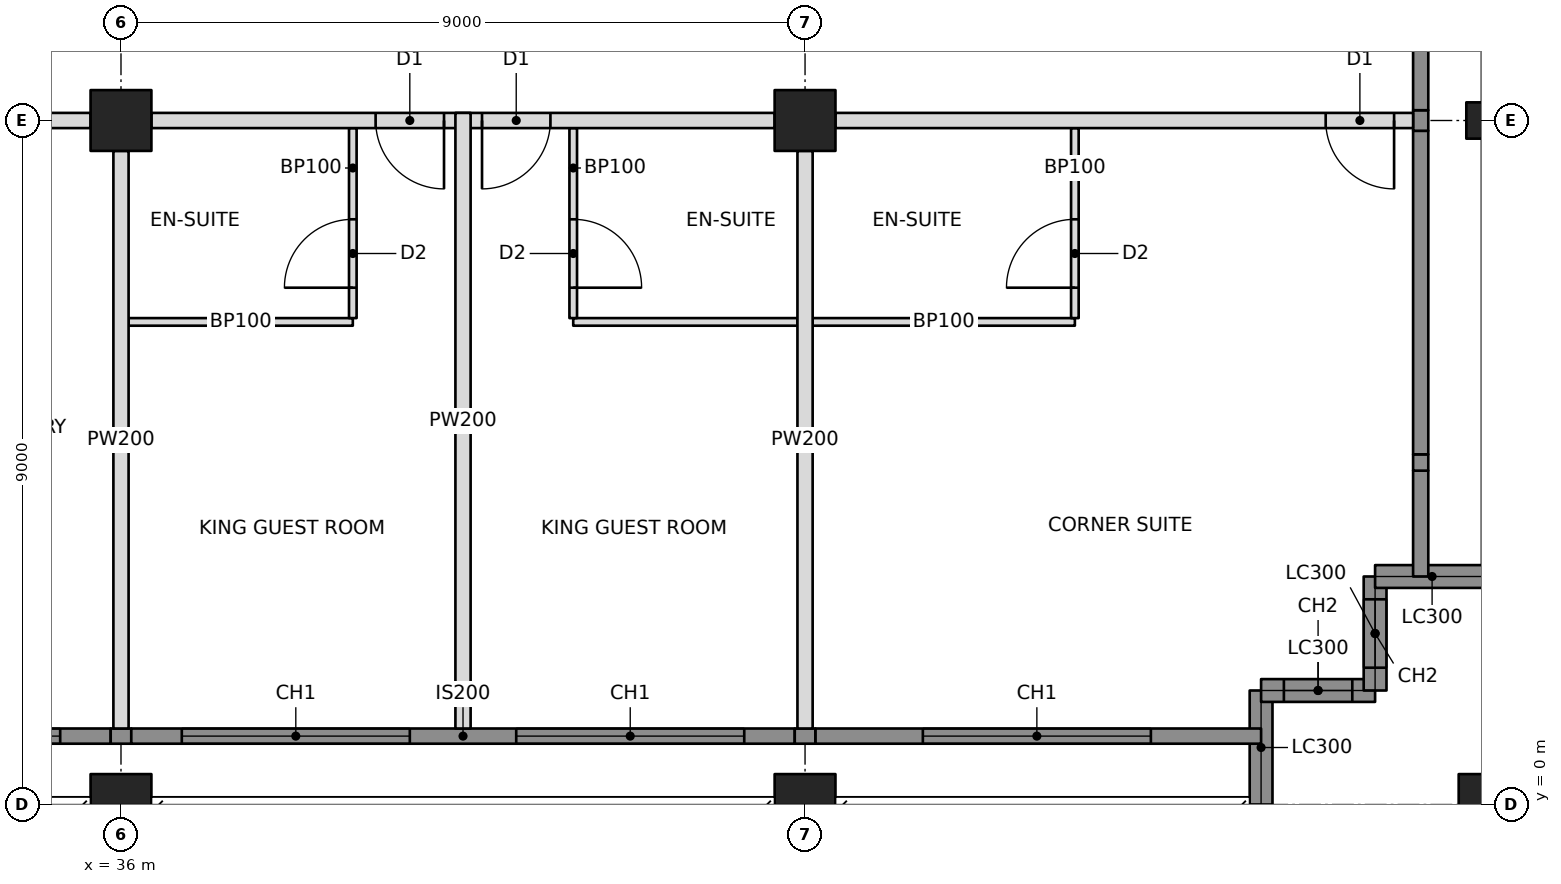
"""IFC4 building model, lengths in metres.
Left out: names, types, materials, properties, quantities, classifications, styles, units other than length and angle.
Written with IfcOpenShell. Run it as: python <this file> out.ifc"""

import sys

from ifc_helpers import new_model, si_unit, direction, frame, frame_2d, origin, origin_2d, place, context, subcontext, project, spatial, rectangle, hollow_rectangle, i_section, extrude, element, fill, save


model = new_model("IFC4")
c1 = context("Model", 3, precision=1e-05, world=origin(), true_north=direction((0.0, 1.0)))
c2 = subcontext(c1, "Body", "Model", "MODEL_VIEW")
j1 = project(units=[si_unit("LENGTHUNIT", "METRE"), si_unit("PLANEANGLEUNIT", "RADIAN")], contexts=[c1])
p1 = place(None, origin())
s1 = spatial("IfcSite", under=j1, at=p1, CompositionType="ELEMENT")
p2 = place(p1, origin())
s2 = spatial("IfcBuilding", under=s1, at=p2, CompositionType="ELEMENT")
p3 = place(p2, frame((0.0, 0.0, 28.0)))
s3 = spatial("IfcBuildingStorey", under=s2, at=p3, CompositionType="ELEMENT", Elevation=28.0)
for number, where, z_axis, x_axis in (
    (1, (36.0, 0.0, 0.0), (0.0, 0.0, 1.0), (1.0, 0.0, 0.0)),
    (2, (36.0, 9.0, 0.0), (0.0, 0.0, 1.0), (0.0, 1.0, 0.0)),
    (3, (45.0, 0.0, 0.0), (0.0, 0.0, 1.0), (1.0, 0.0, 0.0)),
    (4, (45.0, 9.0, 0.0), (0.0, 0.0, 1.0), (0.0, 1.0, 0.0)),
    (5, (54.0, 0.0, 0.0), (0.0, 0.0, 1.0), (1.0, 0.0, 0.0)),
):
    element("IfcColumn", number, at=place(p3, frame(where, z_axis=z_axis, x_axis=x_axis)), inside=s3, PredefinedType="COLUMN", context=c2, shape_type="SweptSolid", body=[
        extrude(hollow_rectangle(XDim=0.8, YDim=0.8, WallThickness=0.1, at=origin_2d()), origin(), (0.0, 0.0, 1.0), 3.4),
    ])
p4 = place(p3, frame((54.0, 9.0, 0.0), z_axis=(0.0, 0.0, 1.0), x_axis=(0.0, 1.0, 0.0)))
e6 = element("IfcColumn", 6, at=p4, inside=s3, PredefinedType="COLUMN", context=c2, shape_type="SweptSolid", body=[
    extrude(i_section(OverallWidth=0.478, OverallDepth=0.599, WebThickness=0.1, FlangeThickness=0.14, at=origin_2d()), origin(), (0.0, 0.0, 1.0), 3.4),
])
p5 = place(p3, frame((51.0, 0.0, 0.0), z_axis=(0.0, 0.0, 1.0), x_axis=(0.0, 1.0, 0.0)))
e7 = element("IfcWall", 7, at=p5, inside=s3, PredefinedType="SOLIDWALL", context=c2, shape_type="SweptSolid", body=[
    extrude(rectangle(XDim=1.5, YDim=0.3, at=frame_2d((0.75, 0.0))), origin(), (0.0, 0.0, 1.0), 2.42),
])
p6 = place(p3, frame((51.0, 1.5, 0.0), z_axis=(0.0, 0.0, 1.0), x_axis=(1.0, 0.0, 0.0)))
e8 = element("IfcWall", 8, at=p6, inside=s3, PredefinedType="SOLIDWALL", context=c2, shape_type="SweptSolid", body=[
    extrude(rectangle(XDim=1.5, YDim=0.3, at=frame_2d((0.75, 0.0))), origin(), (0.0, 0.0, 1.0), 3.2),
])
p7 = place(p6, frame((0.3, 0.0, 0.6)))
e9 = element("IfcOpeningElement", 9, at=p7, cuts=e8, PredefinedType="OPENING", context=c2, shape_type="SweptSolid", body=[
    extrude(rectangle(XDim=0.9, YDim=2.2, at=frame_2d((0.45, 1.1))), frame((0.0, 0.16, 0.0), z_axis=(0.0, -1.0, 0.0), x_axis=(1.0, 0.0, 0.0)), (0.0, 0.0, 1.0), 0.32),
])
p8 = place(p3, frame((52.5, 1.5, 0.0), z_axis=(0.0, 0.0, 1.0), x_axis=(0.0, 1.0, 0.0)))
e10 = element("IfcWall", 10, at=p8, inside=s3, PredefinedType="SOLIDWALL", context=c2, shape_type="SweptSolid", body=[
    extrude(rectangle(XDim=1.5, YDim=0.3, at=frame_2d((0.75, 0.0))), origin(), (0.0, 0.0, 1.0), 3.2),
])
p9 = place(p8, frame((0.3, 0.0, 0.6)))
e11 = element("IfcOpeningElement", 11, at=p9, cuts=e10, PredefinedType="OPENING", context=c2, shape_type="SweptSolid", body=[
    extrude(rectangle(XDim=0.9, YDim=2.2, at=frame_2d((0.45, 1.1))), frame((0.0, 0.16, 0.0), z_axis=(0.0, -1.0, 0.0), x_axis=(1.0, 0.0, 0.0)), (0.0, 0.0, 1.0), 0.32),
])
p10 = place(p3, frame((52.5, 3.0, 0.0), z_axis=(0.0, 0.0, 1.0), x_axis=(1.0, 0.0, 0.0)))
e12 = element("IfcWall", 12, at=p10, inside=s3, PredefinedType="SOLIDWALL", context=c2, shape_type="SweptSolid", body=[
    extrude(rectangle(XDim=1.5, YDim=0.3, at=frame_2d((0.75, 0.0))), origin(), (0.0, 0.0, 1.0), 2.42),
])
p11 = place(p3, frame((53.1, 3.0, 0.0), z_axis=(0.0, 0.0, 1.0), x_axis=(0.0, 1.0, 0.0)))
e13 = element("IfcWall", 13, at=p11, inside=s3, PredefinedType="SOLIDWALL", context=c2, shape_type="SweptSolid", body=[
    extrude(rectangle(XDim=1.393, YDim=0.2, at=frame_2d((0.696, 0.0))), origin(), (0.0, 0.0, 1.0), 3.2),
])
p12 = place(p3, frame((27.4, 9.0, 0.0), z_axis=(0.0, 0.0, 1.0), x_axis=(1.0, 0.0, 0.0)))
e14 = element("IfcWall", 14, at=p12, inside=s3, PredefinedType="PARTITIONING", context=c2, shape_type="SweptSolid", body=[
    extrude(rectangle(XDim=8.2, YDim=0.2, at=frame_2d((4.1, 0.0))), origin(), (0.0, 0.0, 1.0), 2.405),
])
p13 = place(p12, frame((2.95, 0.0, 0.0)))
e15 = element("IfcOpeningElement", 15, at=p13, cuts=e14, PredefinedType="OPENING", context=c2, shape_type="SweptSolid", body=[
    extrude(rectangle(XDim=0.9, YDim=2.1, at=frame_2d((0.45, 1.05))), frame((0.0, 0.11, 0.0), z_axis=(0.0, -1.0, 0.0), x_axis=(1.0, 0.0, 0.0)), (0.0, 0.0, 1.0), 0.22),
])
p14 = place(p12, frame((4.35, 0.0, 0.0)))
e16 = element("IfcOpeningElement", 16, at=p14, cuts=e14, PredefinedType="OPENING", context=c2, shape_type="SweptSolid", body=[
    extrude(rectangle(XDim=1.0, YDim=2.1, at=frame_2d((0.5, 1.05))), frame((0.0, 0.11, 0.0), z_axis=(0.0, -1.0, 0.0), x_axis=(1.0, 0.0, 0.0)), (0.0, 0.0, 1.0), 0.22),
])
p15 = place(p3, frame((36.4, 9.0, 0.0), z_axis=(0.0, 0.0, 1.0), x_axis=(1.0, 0.0, 0.0)))
e17 = element("IfcWall", 17, at=p15, inside=s3, PredefinedType="PARTITIONING", context=c2, shape_type="SweptSolid", body=[
    extrude(rectangle(XDim=8.2, YDim=0.2, at=frame_2d((4.1, 0.0))), origin(), (0.0, 0.0, 1.0), 2.438),
])
p16 = place(p15, frame((2.95, 0.0, 0.0)))
e18 = element("IfcOpeningElement", 18, at=p16, cuts=e17, PredefinedType="OPENING", context=c2, shape_type="SweptSolid", body=[
    extrude(rectangle(XDim=0.9, YDim=2.1, at=frame_2d((0.45, 1.05))), frame((0.0, 0.11, 0.0), z_axis=(0.0, -1.0, 0.0), x_axis=(1.0, 0.0, 0.0)), (0.0, 0.0, 1.0), 0.22),
])
p17 = place(p15, frame((4.35, 0.0, 0.0)))
e19 = element("IfcOpeningElement", 19, at=p17, cuts=e17, PredefinedType="OPENING", context=c2, shape_type="SweptSolid", body=[
    extrude(rectangle(XDim=0.9, YDim=2.1, at=frame_2d((0.45, 1.05))), frame((0.0, 0.11, 0.0), z_axis=(0.0, -1.0, 0.0), x_axis=(1.0, 0.0, 0.0)), (0.0, 0.0, 1.0), 0.22),
])
p18 = place(p3, frame((45.4, 9.0, 0.0), z_axis=(0.0, 0.0, 1.0), x_axis=(1.0, 0.0, 0.0)))
e20 = element("IfcWall", 20, at=p18, inside=s3, PredefinedType="PARTITIONING", context=c2, shape_type="SweptSolid", body=[
    extrude(rectangle(XDim=7.6, YDim=0.2, at=frame_2d((3.8, 0.0))), origin(), (0.0, 0.0, 1.0), 2.438),
])
p19 = place(p18, frame((6.45, 0.0, 0.0)))
e21 = element("IfcOpeningElement", 21, at=p19, cuts=e20, PredefinedType="OPENING", context=c2, shape_type="SweptSolid", body=[
    extrude(rectangle(XDim=0.9, YDim=2.1, at=frame_2d((0.45, 1.05))), frame((0.0, 0.11, 0.0), z_axis=(0.0, -1.0, 0.0), x_axis=(1.0, 0.0, 0.0)), (0.0, 0.0, 1.0), 0.22),
])
for number, where, z_axis, x_axis in (
    (22, (36.0, 8.6, 0.0), (0.0, 0.0, 1.0), (0.0, -1.0, 0.0)),
    (23, (45.0, 8.6, 0.0), (0.0, 0.0, 1.0), (0.0, -1.0, 0.0)),
):
    element("IfcWall", number, at=place(p3, frame(where, z_axis=z_axis, x_axis=x_axis)), inside=s3, PredefinedType="PARTITIONING", context=c2, shape_type="SweptSolid", body=[
        extrude(rectangle(XDim=7.6, YDim=0.2, at=frame_2d((3.8, 0.0))), origin(), (0.0, 0.0, 1.0), 2.438),
    ])
p20 = place(p3, frame((40.5, 9.1, 0.0), z_axis=(0.0, 0.0, 1.0), x_axis=(0.0, -1.0, 0.0)))
e24 = element("IfcWall", 24, at=p20, inside=s3, PredefinedType="PARTITIONING", context=c2, shape_type="SweptSolid", body=[
    extrude(rectangle(XDim=8.1, YDim=0.2, at=frame_2d((4.05, 0.0))), origin(), (0.0, 0.0, 1.0), 2.438),
])
p21 = place(p3, frame((36.1, 6.35, 0.0), z_axis=(0.0, 0.0, 1.0), x_axis=(1.0, 0.0, 0.0)))
e25 = element("IfcWall", 25, at=p21, inside=s3, PredefinedType="PARTITIONING", context=c2, shape_type="SweptSolid", body=[
    extrude(rectangle(XDim=2.95, YDim=0.1, at=frame_2d((1.475, 0.0))), origin(), (0.0, 0.0, 1.0), 2.438),
])
p22 = place(p3, frame((39.05, 8.9, 0.0), z_axis=(0.0, 0.0, 1.0), x_axis=(0.0, -1.0, 0.0)))
e26 = element("IfcWall", 26, at=p22, inside=s3, PredefinedType="PARTITIONING", context=c2, shape_type="SweptSolid", body=[
    extrude(rectangle(XDim=2.5, YDim=0.1, at=frame_2d((1.25, 0.0))), origin(), (0.0, 0.0, 1.0), 2.438),
])
p23 = place(p22, frame((1.2, 0.0, 0.0)))
e27 = element("IfcOpeningElement", 27, at=p23, cuts=e26, PredefinedType="OPENING", context=c2, shape_type="SweptSolid", body=[
    extrude(rectangle(XDim=0.9, YDim=2.1, at=frame_2d((0.45, 1.05))), frame((0.0, 0.06, 0.0), z_axis=(0.0, -1.0, 0.0), x_axis=(1.0, 0.0, 0.0)), (0.0, 0.0, 1.0), 0.12),
])
p24 = place(p3, frame((41.95, 6.35, 0.0), z_axis=(0.0, 0.0, 1.0), x_axis=(1.0, 0.0, 0.0)))
e28 = element("IfcWall", 28, at=p24, inside=s3, PredefinedType="PARTITIONING", context=c2, shape_type="SweptSolid", body=[
    extrude(rectangle(XDim=2.95, YDim=0.1, at=frame_2d((1.475, 0.0))), origin(), (0.0, 0.0, 1.0), 2.438),
])
p25 = place(p3, frame((41.95, 8.9, 0.0), z_axis=(0.0, 0.0, 1.0), x_axis=(0.0, -1.0, 0.0)))
e29 = element("IfcWall", 29, at=p25, inside=s3, PredefinedType="PARTITIONING", context=c2, shape_type="SweptSolid", body=[
    extrude(rectangle(XDim=2.5, YDim=0.1, at=frame_2d((1.25, 0.0))), origin(), (0.0, 0.0, 1.0), 2.438),
])
p26 = place(p25, frame((1.2, 0.0, 0.0)))
e30 = element("IfcOpeningElement", 30, at=p26, cuts=e29, PredefinedType="OPENING", context=c2, shape_type="SweptSolid", body=[
    extrude(rectangle(XDim=0.9, YDim=2.1, at=frame_2d((0.45, 1.05))), frame((0.0, 0.06, 0.0), z_axis=(0.0, -1.0, 0.0), x_axis=(1.0, 0.0, 0.0)), (0.0, 0.0, 1.0), 0.12),
])
p27 = place(p3, frame((45.1, 6.35, 0.0), z_axis=(0.0, 0.0, 1.0), x_axis=(1.0, 0.0, 0.0)))
e31 = element("IfcWall", 31, at=p27, inside=s3, PredefinedType="PARTITIONING", context=c2, shape_type="SweptSolid", body=[
    extrude(rectangle(XDim=3.45, YDim=0.1, at=frame_2d((1.725, 0.0))), origin(), (0.0, 0.0, 1.0), 2.438),
])
p28 = place(p3, frame((48.55, 8.9, 0.0), z_axis=(0.0, 0.0, 1.0), x_axis=(0.0, -1.0, 0.0)))
e32 = element("IfcWall", 32, at=p28, inside=s3, PredefinedType="PARTITIONING", context=c2, shape_type="SweptSolid", body=[
    extrude(rectangle(XDim=2.5, YDim=0.1, at=frame_2d((1.25, 0.0))), origin(), (0.0, 0.0, 1.0), 2.438),
])
p29 = place(p28, frame((1.2, 0.0, 0.0)))
e33 = element("IfcOpeningElement", 33, at=p29, cuts=e32, PredefinedType="OPENING", context=c2, shape_type="SweptSolid", body=[
    extrude(rectangle(XDim=0.9, YDim=2.1, at=frame_2d((0.45, 1.05))), frame((0.0, 0.06, 0.0), z_axis=(0.0, -1.0, 0.0), x_axis=(1.0, 0.0, 0.0)), (0.0, 0.0, 1.0), 0.12),
])
p30 = place(p3, frame((27.194, 0.9, 0.0), z_axis=(0.0, 0.0, 1.0), x_axis=(1.0, 0.0, 0.0)))
e34 = element("IfcWall", 34, at=p30, inside=s3, PredefinedType="SOLIDWALL", context=c2, shape_type="SweptSolid", body=[
    extrude(rectangle(XDim=8.671, YDim=0.2, at=frame_2d((4.335, 0.0))), origin(), (0.0, 0.0, 1.0), 3.2),
])
p31 = place(p30, frame((0.606, 0.0, 0.6)))
e35 = element("IfcOpeningElement", 35, at=p31, cuts=e34, PredefinedType="OPENING", context=c2, shape_type="SweptSolid", body=[
    extrude(rectangle(XDim=3.0, YDim=2.2, at=frame_2d((1.5, 1.1))), frame((0.0, 0.11, 0.0), z_axis=(0.0, -1.0, 0.0), x_axis=(1.0, 0.0, 0.0)), (0.0, 0.0, 1.0), 0.22),
])
p32 = place(p30, frame((5.006, 0.0, 0.6)))
e36 = element("IfcOpeningElement", 36, at=p32, cuts=e34, PredefinedType="OPENING", context=c2, shape_type="SweptSolid", body=[
    extrude(rectangle(XDim=3.0, YDim=2.2, at=frame_2d((1.5, 1.1))), frame((0.0, 0.11, 0.0), z_axis=(0.0, -1.0, 0.0), x_axis=(1.0, 0.0, 0.0)), (0.0, 0.0, 1.0), 0.22),
])
p33 = place(p3, frame((35.865, 0.9, 0.0), z_axis=(0.0, 0.0, 1.0), x_axis=(1.0, 0.0, 0.0)))
e37 = element("IfcWall", 37, at=p33, inside=s3, PredefinedType="SOLIDWALL", context=c2, shape_type="SweptSolid", body=[
    extrude(rectangle(XDim=0.271, YDim=0.2, at=frame_2d((0.135, 0.0))), origin(), (0.0, 0.0, 1.0), 2.438),
])
p34 = place(p3, frame((36.135, 0.9, 0.0), z_axis=(0.0, 0.0, 1.0), x_axis=(1.0, 0.0, 0.0)))
e38 = element("IfcWall", 38, at=p34, inside=s3, PredefinedType="SOLIDWALL", context=c2, shape_type="SweptSolid", body=[
    extrude(rectangle(XDim=8.729, YDim=0.2, at=frame_2d((4.365, 0.0))), origin(), (0.0, 0.0, 1.0), 3.2),
])
p35 = place(p34, frame((0.665, 0.0, 0.6)))
e39 = element("IfcOpeningElement", 39, at=p35, cuts=e38, PredefinedType="OPENING", context=c2, shape_type="SweptSolid", body=[
    extrude(rectangle(XDim=3.0, YDim=2.2, at=frame_2d((1.5, 1.1))), frame((0.0, 0.11, 0.0), z_axis=(0.0, -1.0, 0.0), x_axis=(1.0, 0.0, 0.0)), (0.0, 0.0, 1.0), 0.22),
])
p36 = place(p34, frame((5.065, 0.0, 0.6)))
e40 = element("IfcOpeningElement", 40, at=p36, cuts=e38, PredefinedType="OPENING", context=c2, shape_type="SweptSolid", body=[
    extrude(rectangle(XDim=3.0, YDim=2.2, at=frame_2d((1.5, 1.1))), frame((0.0, 0.11, 0.0), z_axis=(0.0, -1.0, 0.0), x_axis=(1.0, 0.0, 0.0)), (0.0, 0.0, 1.0), 0.22),
])
p37 = place(p3, frame((44.865, 0.9, 0.0), z_axis=(0.0, 0.0, 1.0), x_axis=(1.0, 0.0, 0.0)))
e41 = element("IfcWall", 41, at=p37, inside=s3, PredefinedType="SOLIDWALL", context=c2, shape_type="SweptSolid", body=[
    extrude(rectangle(XDim=0.271, YDim=0.2, at=frame_2d((0.135, 0.0))), origin(), (0.0, 0.0, 1.0), 2.438),
])
p38 = place(p3, frame((45.135, 0.9, 0.0), z_axis=(0.0, 0.0, 1.0), x_axis=(1.0, 0.0, 0.0)))
e42 = element("IfcWall", 42, at=p38, inside=s3, PredefinedType="SOLIDWALL", context=c2, shape_type="SweptSolid", body=[
    extrude(rectangle(XDim=5.865, YDim=0.2, at=frame_2d((2.932, 0.0))), origin(), (0.0, 0.0, 1.0), 3.2),
])
p39 = place(p38, frame((1.415, 0.0, 0.6)))
e43 = element("IfcOpeningElement", 43, at=p39, cuts=e42, PredefinedType="OPENING", context=c2, shape_type="SweptSolid", body=[
    extrude(rectangle(XDim=3.0, YDim=2.2, at=frame_2d((1.5, 1.1))), frame((0.0, 0.11, 0.0), z_axis=(0.0, -1.0, 0.0), x_axis=(1.0, 0.0, 0.0)), (0.0, 0.0, 1.0), 0.22),
])
p40 = place(p3, frame((53.1, 4.393, 0.0), z_axis=(0.0, 0.0, 1.0), x_axis=(0.0, 1.0, 0.0)))
e44 = element("IfcWall", 44, at=p40, inside=s3, PredefinedType="SOLIDWALL", context=c2, shape_type="SweptSolid", body=[
    extrude(rectangle(XDim=0.215, YDim=0.2, at=frame_2d((0.107, 0.0))), origin(), (0.0, 0.0, 1.0), 2.661),
])
p41 = place(p3, frame((53.1, 4.607, 0.0), z_axis=(0.0, 0.0, 1.0), x_axis=(0.0, 1.0, 0.0)))
e45 = element("IfcWall", 45, at=p41, inside=s3, PredefinedType="SOLIDWALL", context=c2, shape_type="SweptSolid", body=[
    extrude(rectangle(XDim=4.257, YDim=0.2, at=frame_2d((2.129, 0.0))), origin(), (0.0, 0.0, 1.0), 3.2),
])
p42 = place(p3, frame((53.1, 8.865, 0.0), z_axis=(0.0, 0.0, 1.0), x_axis=(0.0, 1.0, 0.0)))
e46 = element("IfcWall", 46, at=p42, inside=s3, PredefinedType="SOLIDWALL", context=c2, shape_type="SweptSolid", body=[
    extrude(rectangle(XDim=0.271, YDim=0.2, at=frame_2d((0.135, 0.0))), origin(), (0.0, 0.0, 1.0), 2.438),
])
p43 = place(p3, frame((53.1, 9.135, 0.0), z_axis=(0.0, 0.0, 1.0), x_axis=(0.0, 1.0, 0.0)))
e47 = element("IfcWall", 47, at=p43, inside=s3, PredefinedType="SOLIDWALL", context=c2, shape_type="SweptSolid", body=[
    extrude(rectangle(XDim=8.729, YDim=0.2, at=frame_2d((4.365, 0.0))), origin(), (0.0, 0.0, 1.0), 3.2),
])
p44 = place(p43, frame((2.015, 0.0, 0.6)))
e48 = element("IfcOpeningElement", 48, at=p44, cuts=e47, PredefinedType="OPENING", context=c2, shape_type="SweptSolid", body=[
    extrude(rectangle(XDim=3.0, YDim=2.2, at=frame_2d((1.5, 1.1))), frame((0.0, 0.11, 0.0), z_axis=(0.0, -1.0, 0.0), x_axis=(1.0, 0.0, 0.0)), (0.0, 0.0, 1.0), 0.22),
])
p45 = place(p43, frame((5.515, 0.0, 0.6)))
e49 = element("IfcOpeningElement", 49, at=p45, cuts=e47, PredefinedType="OPENING", context=c2, shape_type="SweptSolid", body=[
    extrude(rectangle(XDim=3.0, YDim=2.2, at=frame_2d((1.5, 1.1))), frame((0.0, 0.11, 0.0), z_axis=(0.0, -1.0, 0.0), x_axis=(1.0, 0.0, 0.0)), (0.0, 0.0, 1.0), 0.22),
])
p46 = place(p7, origin())
e50 = element("IfcWindow", 50, at=p46, inside=s3, PartitioningType="SINGLE_PANEL", PredefinedType="WINDOW", context=c2, shape_type="SweptSolid", body=[
    extrude(rectangle(XDim=0.9, YDim=2.2, at=frame_2d((0.45, 1.1))), frame((0.0, 0.03, 0.0), z_axis=(0.0, -1.0, 0.0), x_axis=(1.0, 0.0, 0.0)), (0.0, 0.0, 1.0), 0.06),
])
fill(e9, e50)
p47 = place(p9, origin())
e51 = element("IfcWindow", 51, at=p47, inside=s3, PartitioningType="SINGLE_PANEL", PredefinedType="WINDOW", context=c2, shape_type="SweptSolid", body=[
    extrude(rectangle(XDim=0.9, YDim=2.2, at=frame_2d((0.45, 1.1))), frame((0.0, 0.03, 0.0), z_axis=(0.0, -1.0, 0.0), x_axis=(1.0, 0.0, 0.0)), (0.0, 0.0, 1.0), 0.06),
])
fill(e11, e51)
p48 = place(p32, origin())
e52 = element("IfcWindow", 52, at=p48, inside=s3, PartitioningType="TRIPLE_PANEL_VERTICAL", PredefinedType="WINDOW", context=c2, shape_type="SweptSolid", body=[
    extrude(rectangle(XDim=3.0, YDim=2.2, at=frame_2d((1.5, 1.1))), frame((0.0, 0.03, 0.0), z_axis=(0.0, -1.0, 0.0), x_axis=(1.0, 0.0, 0.0)), (0.0, 0.0, 1.0), 0.06),
])
fill(e36, e52)
p49 = place(p35, origin())
e53 = element("IfcWindow", 53, at=p49, inside=s3, PartitioningType="TRIPLE_PANEL_VERTICAL", PredefinedType="WINDOW", context=c2, shape_type="SweptSolid", body=[
    extrude(rectangle(XDim=3.0, YDim=2.2, at=frame_2d((1.5, 1.1))), frame((0.0, 0.03, 0.0), z_axis=(0.0, -1.0, 0.0), x_axis=(1.0, 0.0, 0.0)), (0.0, 0.0, 1.0), 0.06),
])
fill(e39, e53)
p50 = place(p36, origin())
e54 = element("IfcWindow", 54, at=p50, inside=s3, PartitioningType="TRIPLE_PANEL_VERTICAL", PredefinedType="WINDOW", context=c2, shape_type="SweptSolid", body=[
    extrude(rectangle(XDim=3.0, YDim=2.2, at=frame_2d((1.5, 1.1))), frame((0.0, 0.03, 0.0), z_axis=(0.0, -1.0, 0.0), x_axis=(1.0, 0.0, 0.0)), (0.0, 0.0, 1.0), 0.06),
])
fill(e40, e54)
p51 = place(p39, origin())
e55 = element("IfcWindow", 55, at=p51, inside=s3, PartitioningType="TRIPLE_PANEL_VERTICAL", PredefinedType="WINDOW", context=c2, shape_type="SweptSolid", body=[
    extrude(rectangle(XDim=3.0, YDim=2.2, at=frame_2d((1.5, 1.1))), frame((0.0, 0.03, 0.0), z_axis=(0.0, -1.0, 0.0), x_axis=(1.0, 0.0, 0.0)), (0.0, 0.0, 1.0), 0.06),
])
fill(e43, e55)
p52 = place(p23, frame((0.9, 0.0, 0.0), z_axis=(0.0, 0.0, 1.0), x_axis=(-1.0, 0.0, 0.0)))
e56 = element("IfcDoor", 56, at=p52, inside=s3, OperationType="SINGLE_SWING_LEFT", PredefinedType="DOOR", context=c2, shape_type="SweptSolid", body=[
    extrude(rectangle(XDim=0.9, YDim=2.1, at=frame_2d((0.45, 1.05))), frame((0.0, 0.025, 0.0), z_axis=(0.0, -1.0, 0.0), x_axis=(1.0, 0.0, 0.0)), (0.0, 0.0, 1.0), 0.05),
])
fill(e27, e56)
p53 = place(p16, frame((0.9, 0.0, 0.0), z_axis=(0.0, 0.0, 1.0), x_axis=(-1.0, 0.0, 0.0)))
e57 = element("IfcDoor", 57, at=p53, inside=s3, OperationType="SINGLE_SWING_LEFT", PredefinedType="DOOR", context=c2, shape_type="SweptSolid", body=[
    extrude(rectangle(XDim=0.9, YDim=2.1, at=frame_2d((0.45, 1.05))), frame((0.0, 0.025, 0.0), z_axis=(0.0, -1.0, 0.0), x_axis=(1.0, 0.0, 0.0)), (0.0, 0.0, 1.0), 0.05),
])
fill(e18, e57)
p54 = place(p26, origin())
e58 = element("IfcDoor", 58, at=p54, inside=s3, OperationType="SINGLE_SWING_RIGHT", PredefinedType="DOOR", context=c2, shape_type="SweptSolid", body=[
    extrude(rectangle(XDim=0.9, YDim=2.1, at=frame_2d((0.45, 1.05))), frame((0.0, 0.025, 0.0), z_axis=(0.0, -1.0, 0.0), x_axis=(1.0, 0.0, 0.0)), (0.0, 0.0, 1.0), 0.05),
])
fill(e30, e58)
p55 = place(p17, frame((0.9, 0.0, 0.0), z_axis=(0.0, 0.0, 1.0), x_axis=(-1.0, 0.0, 0.0)))
e59 = element("IfcDoor", 59, at=p55, inside=s3, OperationType="SINGLE_SWING_RIGHT", PredefinedType="DOOR", context=c2, shape_type="SweptSolid", body=[
    extrude(rectangle(XDim=0.9, YDim=2.1, at=frame_2d((0.45, 1.05))), frame((0.0, 0.025, 0.0), z_axis=(0.0, -1.0, 0.0), x_axis=(1.0, 0.0, 0.0)), (0.0, 0.0, 1.0), 0.05),
])
fill(e19, e59)
p56 = place(p29, frame((0.9, 0.0, 0.0), z_axis=(0.0, 0.0, 1.0), x_axis=(-1.0, 0.0, 0.0)))
e60 = element("IfcDoor", 60, at=p56, inside=s3, OperationType="SINGLE_SWING_LEFT", PredefinedType="DOOR", context=c2, shape_type="SweptSolid", body=[
    extrude(rectangle(XDim=0.9, YDim=2.1, at=frame_2d((0.45, 1.05))), frame((0.0, 0.025, 0.0), z_axis=(0.0, -1.0, 0.0), x_axis=(1.0, 0.0, 0.0)), (0.0, 0.0, 1.0), 0.05),
])
fill(e33, e60)
p57 = place(p19, frame((0.9, 0.0, 0.0), z_axis=(0.0, 0.0, 1.0), x_axis=(-1.0, 0.0, 0.0)))
e61 = element("IfcDoor", 61, at=p57, inside=s3, OperationType="SINGLE_SWING_LEFT", PredefinedType="DOOR", context=c2, shape_type="SweptSolid", body=[
    extrude(rectangle(XDim=0.9, YDim=2.1, at=frame_2d((0.45, 1.05))), frame((0.0, 0.025, 0.0), z_axis=(0.0, -1.0, 0.0), x_axis=(1.0, 0.0, 0.0)), (0.0, 0.0, 1.0), 0.05),
])
fill(e21, e61)
save(model, sys.argv[1])
